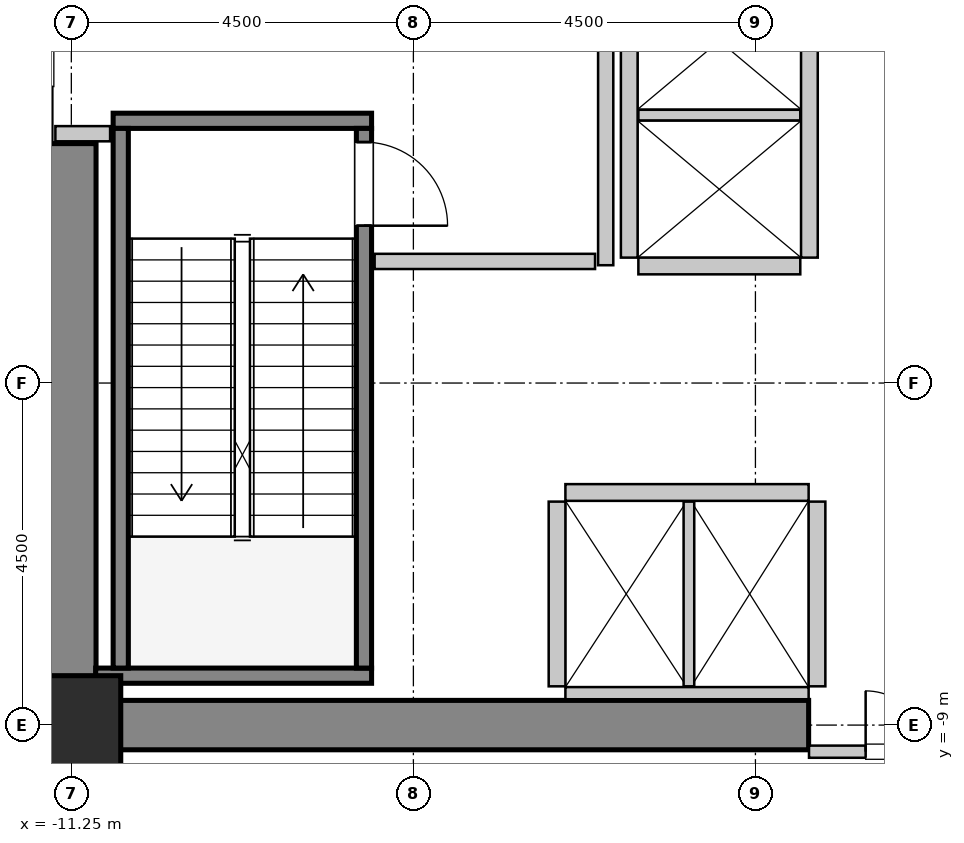
"""IFC4 building model, lengths in metres.
Left out: names, types, materials, properties, quantities, classifications, styles, units other than length and angle.
Written with IfcOpenShell. Run it as: python <this file> out.ifc"""

import sys

from ifc_helpers import new_model, si_unit, direction, frame, frame_2d, origin, origin_2d, place, context, subcontext, project, spatial, rectangle, hollow_rectangle, extrude, source, transform, mapped, element, fill, save


model = new_model("IFC4")
c1 = context("Model", 3, precision=1e-05, world=origin(), true_north=direction((0.0, 1.0)))
c2 = subcontext(c1, "Body", "Model", "MODEL_VIEW")
j1 = project(units=[si_unit("LENGTHUNIT", "METRE"), si_unit("PLANEANGLEUNIT", "RADIAN")], contexts=[c1])
p1 = place(None, origin())
s1 = spatial("IfcSite", under=j1, at=p1, CompositionType="ELEMENT")
p2 = place(p1, origin())
s2 = spatial("IfcBuilding", under=s1, at=p2, CompositionType="ELEMENT")
p3 = place(p2, frame((0.0, 0.0, 11.4)))
s3 = spatial("IfcBuildingStorey", under=s2, at=p3, CompositionType="ELEMENT", Elevation=11.4)
m1 = source(origin(), c2, "Body", "SweptSolid", [
    extrude(rectangle(XDim=10.025, YDim=0.65, at=frame_2d((5.012, 0.0))), origin(), (0.0, 0.0, 1.0), 5.4),
])
p4 = place(p3, frame((-11.575, -9.0, 0.0), z_axis=(0.0, 0.0, 1.0), x_axis=(1.0, 0.0, 0.0)))
e1 = element("IfcWall", 1, at=p4, inside=s3, PredefinedType="SHEAR", context=c2, shape_type="MappedRepresentation", body=[
    mapped(m1, transform((0.0, 0.0, 0.0), x_axis=(1.0, 0.0, 0.0), y_axis=(0.0, 1.0, 0.0), z_axis=(0.0, 0.0, 1.0), scale=1.0)),
])
m2 = source(origin(), c2, "Body", "SweptSolid", [
    extrude(rectangle(XDim=7.325, YDim=0.65, at=frame_2d((3.663, 0.0))), origin(), (0.0, 0.0, 1.0), 5.4),
])
p5 = place(p3, frame((-11.25, -8.675, 0.0), z_axis=(0.0, 0.0, 1.0), x_axis=(0.0, 1.0, 0.0)))
e2 = element("IfcWall", 2, at=p5, inside=s3, PredefinedType="SHEAR", context=c2, shape_type="MappedRepresentation", body=[
    mapped(m2, transform((0.0, 0.0, 0.0), x_axis=(1.0, 0.0, 0.0), y_axis=(0.0, 1.0, 0.0), z_axis=(0.0, 0.0, 1.0), scale=1.0)),
])
m3 = source(origin(), c2, "Body", "SweptSolid", [
    extrude(hollow_rectangle(XDim=1.3, YDim=1.3, WallThickness=0.065, InnerFilletRadius=0.065, OuterFilletRadius=0.13, at=origin_2d()), origin(), (0.0, 0.0, 1.0), 5.4),
])
p6 = place(p3, frame((-11.25, -9.0, 0.0), z_axis=(0.0, 0.0, 1.0), x_axis=(1.0, 0.0, 0.0)))
e3 = element("IfcColumn", 3, at=p6, inside=s3, PredefinedType="COLUMN", context=c2, shape_type="MappedRepresentation", body=[
    mapped(m3, transform((0.0, 0.0, 0.0), x_axis=(1.0, 0.0, 0.0), y_axis=(0.0, 1.0, 0.0), z_axis=(0.0, 0.0, 1.0), scale=1.0)),
])
m4 = source(origin(), c2, "Body", "SweptSolid", [
    extrude(rectangle(XDim=3.4, YDim=0.2, at=frame_2d((1.7, 0.0))), origin(), (0.0, 0.0, 1.0), 5.4),
])
p7 = place(p3, frame((-10.7, -1.05, 0.0), z_axis=(0.0, 0.0, 1.0), x_axis=(1.0, 0.0, 0.0)))
e4 = element("IfcWall", 4, at=p7, inside=s3, PredefinedType="SOLIDWALL", context=c2, shape_type="MappedRepresentation", body=[
    mapped(m4, transform((0.0, 0.0, 0.0), x_axis=(1.0, 0.0, 0.0), y_axis=(0.0, 1.0, 0.0), z_axis=(0.0, 0.0, 1.0), scale=1.0)),
])
m5 = source(origin(), c2, "Body", "SweptSolid", [
    extrude(rectangle(XDim=3.63, YDim=0.2, at=frame_2d((1.815, 0.0))), origin(), (0.0, 0.0, 1.0), 5.4),
])
p8 = place(p3, frame((-10.93, -8.35, 0.0), z_axis=(0.0, 0.0, 1.0), x_axis=(1.0, 0.0, 0.0)))
e5 = element("IfcWall", 5, at=p8, inside=s3, PredefinedType="SOLIDWALL", context=c2, shape_type="MappedRepresentation", body=[
    mapped(m5, transform((0.0, 0.0, 0.0), x_axis=(1.0, 0.0, 0.0), y_axis=(0.0, 1.0, 0.0), z_axis=(0.0, 0.0, 1.0), scale=1.0)),
])
m6 = source(origin(), c2, "Body", "SweptSolid", [
    extrude(rectangle(XDim=7.1, YDim=0.2, at=frame_2d((3.55, 0.0))), origin(), (0.0, 0.0, 1.0), 5.4),
])
p9 = place(p3, frame((-10.6, -1.15, 0.0), z_axis=(0.0, 0.0, 1.0), x_axis=(0.0, -1.0, 0.0)))
e6 = element("IfcWall", 6, at=p9, inside=s3, PredefinedType="SOLIDWALL", context=c2, shape_type="MappedRepresentation", body=[
    mapped(m6, transform((0.0, 0.0, 0.0), x_axis=(1.0, 0.0, 0.0), y_axis=(0.0, 1.0, 0.0), z_axis=(0.0, 0.0, 1.0), scale=1.0)),
])
p10 = place(p3, frame((-7.4, -1.15, 0.0), z_axis=(0.0, 0.0, 1.0), x_axis=(0.0, -1.0, 0.0)))
e7 = element("IfcWall", 7, at=p10, inside=s3, PredefinedType="SOLIDWALL", context=c2, shape_type="MappedRepresentation", body=[
    mapped(m6, transform((0.0, 0.0, 0.0), x_axis=(1.0, 0.0, 0.0), y_axis=(0.0, 1.0, 0.0), z_axis=(0.0, 0.0, 1.0), scale=1.0)),
])
p11 = place(p10, frame((0.18, 0.0, 0.0)))
e8 = element("IfcOpeningElement", 8, at=p11, cuts=e7, PredefinedType="OPENING", context=c2, shape_type="SweptSolid", body=[
    extrude(rectangle(XDim=1.1, YDim=2.15, at=frame_2d((0.55, 1.075))), frame((0.0, 0.11, 0.0), z_axis=(0.0, -1.0, 0.0), x_axis=(1.0, 0.0, 0.0)), (0.0, 0.0, 1.0), 0.22),
])
m7 = source(origin(), c2, "Body", "SweptSolid", [
    extrude(rectangle(XDim=3.2, YDim=0.22, at=frame_2d((1.6, 0.0))), origin(), (0.0, 0.0, 1.0), 5.085),
])
p12 = place(p3, frame((-1.55, -5.94, 0.0), z_axis=(0.0, 0.0, 1.0), x_axis=(-1.0, 0.0, 0.0)))
e9 = element("IfcWall", 9, at=p12, inside=s3, PredefinedType="SOLIDWALL", context=c2, shape_type="MappedRepresentation", body=[
    mapped(m7, transform((0.0, 0.0, 0.0), x_axis=(1.0, 0.0, 0.0), y_axis=(0.0, 1.0, 0.0), z_axis=(0.0, 0.0, 1.0), scale=1.0)),
])
m8 = source(origin(), c2, "Body", "SweptSolid", [
    extrude(rectangle(XDim=3.2, YDim=0.16, at=frame_2d((1.6, 0.0))), origin(), (0.0, 0.0, 1.0), 3.975),
])
p13 = place(p3, frame((-4.75, -8.58, 0.0), z_axis=(0.0, 0.0, 1.0), x_axis=(1.0, 0.0, 0.0)))
e10 = element("IfcWall", 10, at=p13, inside=s3, PredefinedType="PARTITIONING", context=c2, shape_type="MappedRepresentation", body=[
    mapped(m8, transform((0.0, 0.0, 0.0), x_axis=(1.0, 0.0, 0.0), y_axis=(0.0, 1.0, 0.0), z_axis=(0.0, 0.0, 1.0), scale=1.0)),
])
m9 = source(origin(), c2, "Body", "SweptSolid", [
    extrude(rectangle(XDim=2.43, YDim=0.22, at=frame_2d((1.215, 0.0))), origin(), (0.0, 0.0, 1.0), 5.085),
])
p14 = place(p3, frame((-4.86, -6.06, 0.0), z_axis=(0.0, 0.0, 1.0), x_axis=(0.0, -1.0, 0.0)))
e11 = element("IfcWall", 11, at=p14, inside=s3, PredefinedType="SOLIDWALL", context=c2, shape_type="MappedRepresentation", body=[
    mapped(m9, transform((0.0, 0.0, 0.0), x_axis=(1.0, 0.0, 0.0), y_axis=(0.0, 1.0, 0.0), z_axis=(0.0, 0.0, 1.0), scale=1.0)),
])
m10 = source(origin(), c2, "Body", "SweptSolid", [
    extrude(rectangle(XDim=2.43, YDim=0.14, at=frame_2d((1.215, 0.0))), origin(), (0.0, 0.0, 1.0), 5.085),
])
p15 = place(p3, frame((-3.125, -8.49, 0.0), z_axis=(0.0, 0.0, 1.0), x_axis=(0.0, 1.0, 0.0)))
e12 = element("IfcWall", 12, at=p15, inside=s3, PredefinedType="PARTITIONING", context=c2, shape_type="MappedRepresentation", body=[
    mapped(m10, transform((0.0, 0.0, 0.0), x_axis=(1.0, 0.0, 0.0), y_axis=(0.0, 1.0, 0.0), z_axis=(0.0, 0.0, 1.0), scale=1.0)),
])
p16 = place(p3, frame((-1.44, -8.49, 0.0), z_axis=(0.0, 0.0, 1.0), x_axis=(0.0, 1.0, 0.0)))
e13 = element("IfcWall", 13, at=p16, inside=s3, PredefinedType="SOLIDWALL", context=c2, shape_type="MappedRepresentation", body=[
    mapped(m9, transform((0.0, 0.0, 0.0), x_axis=(1.0, 0.0, 0.0), y_axis=(0.0, 1.0, 0.0), z_axis=(0.0, 0.0, 1.0), scale=1.0)),
])
m11 = source(origin(), c2, "Body", "SweptSolid", [
    extrude(rectangle(XDim=5.7, YDim=0.22, at=frame_2d((2.85, 0.0))), origin(), (0.0, 0.0, 1.0), 5.085),
])
for number, where, z_axis, x_axis in (
    (14, (-1.54, -2.85, 0.0), (0.0, 0.0, 1.0), (0.0, 1.0, 0.0)),
    (15, (-3.91, 2.85, 0.0), (0.0, 0.0, 1.0), (0.0, -1.0, 0.0)),
):
    element("IfcWall", number, at=place(p3, frame(where, z_axis=z_axis, x_axis=x_axis)), inside=s3, PredefinedType="SOLIDWALL", context=c2, shape_type="MappedRepresentation", body=[
        mapped(m11, transform((0.0, 0.0, 0.0), x_axis=(1.0, 0.0, 0.0), y_axis=(0.0, 1.0, 0.0), z_axis=(0.0, 0.0, 1.0), scale=1.0)),
    ])
m12 = source(origin(), c2, "Body", "SweptSolid", [
    extrude(rectangle(XDim=2.13, YDim=0.22, at=frame_2d((1.065, 0.0))), origin(), (0.0, 0.0, 1.0), 5.085),
])
p17 = place(p3, frame((-3.79, -2.96, 0.0), z_axis=(0.0, 0.0, 1.0), x_axis=(1.0, 0.0, 0.0)))
e16 = element("IfcWall", 16, at=p17, inside=s3, PredefinedType="SOLIDWALL", context=c2, shape_type="MappedRepresentation", body=[
    mapped(m12, transform((0.0, 0.0, 0.0), x_axis=(1.0, 0.0, 0.0), y_axis=(0.0, 1.0, 0.0), z_axis=(0.0, 0.0, 1.0), scale=1.0)),
])
m13 = source(origin(), c2, "Body", "SweptSolid", [
    extrude(rectangle(XDim=2.13, YDim=0.14, at=frame_2d((1.065, 0.0))), origin(), (0.0, 0.0, 1.0), 5.085),
])
p18 = place(p3, frame((-3.79, -0.975, 0.0), z_axis=(0.0, 0.0, 1.0), x_axis=(1.0, 0.0, 0.0)))
e17 = element("IfcWall", 17, at=p18, inside=s3, PredefinedType="PARTITIONING", context=c2, shape_type="MappedRepresentation", body=[
    mapped(m13, transform((0.0, 0.0, 0.0), x_axis=(1.0, 0.0, 0.0), y_axis=(0.0, 1.0, 0.0), z_axis=(0.0, 0.0, 1.0), scale=1.0)),
])
m14 = source(origin(), c2, "Body", "SweptSolid", [
    extrude(rectangle(XDim=5.9, YDim=0.2, at=frame_2d((2.95, 0.0))), origin(), (0.0, 0.0, 1.0), 5.085),
])
p19 = place(p3, frame((-4.22, -2.95, 0.0), z_axis=(0.0, 0.0, 1.0), x_axis=(0.0, 1.0, 0.0)))
e18 = element("IfcWall", 18, at=p19, inside=s3, PredefinedType="PARTITIONING", context=c2, shape_type="MappedRepresentation", body=[
    mapped(m14, transform((0.0, 0.0, 0.0), x_axis=(1.0, 0.0, 0.0), y_axis=(0.0, 1.0, 0.0), z_axis=(0.0, 0.0, 1.0), scale=1.0)),
])
m15 = source(origin(), c2, "Body", "SweptSolid", [
    extrude(rectangle(XDim=2.9, YDim=0.2, at=frame_2d((1.45, 0.0))), origin(), (0.0, 0.0, 1.0), 5.085),
])
p20 = place(p3, frame((-7.26, -2.9, 0.0), z_axis=(0.0, 0.0, 1.0), x_axis=(1.0, 0.0, 0.0)))
e19 = element("IfcWall", 19, at=p20, inside=s3, PredefinedType="PARTITIONING", context=c2, shape_type="MappedRepresentation", body=[
    mapped(m15, transform((0.0, 0.0, 0.0), x_axis=(1.0, 0.0, 0.0), y_axis=(0.0, 1.0, 0.0), z_axis=(0.0, 0.0, 1.0), scale=1.0)),
])
m16 = source(origin(), c2, "Body", "SweptSolid", [
    extrude(rectangle(XDim=0.72, YDim=0.2, at=frame_2d((0.36, 0.0))), origin(), (0.0, 0.0, 1.0), 5.085),
])
p21 = place(p3, frame((-11.46, -1.22, 0.0), z_axis=(0.0, 0.0, 1.0), x_axis=(1.0, 0.0, 0.0)))
e20 = element("IfcWall", 20, at=p21, inside=s3, PredefinedType="PARTITIONING", context=c2, shape_type="MappedRepresentation", body=[
    mapped(m16, transform((0.0, 0.0, 0.0), x_axis=(1.0, 0.0, 0.0), y_axis=(0.0, 1.0, 0.0), z_axis=(0.0, 0.0, 1.0), scale=1.0)),
])
m17 = source(origin(), c2, "Body", "SweptSolid", [
    extrude(rectangle(XDim=3.09, YDim=0.16, at=frame_2d((1.545, 0.0))), origin(), (0.0, 0.0, 1.0), 3.975),
])
p22 = place(p3, frame((-1.545, -9.35, 0.0), z_axis=(0.0, 0.0, 1.0), x_axis=(1.0, 0.0, 0.0)))
e21 = element("IfcWall", 21, at=p22, inside=s3, PredefinedType="PARTITIONING", context=c2, shape_type="MappedRepresentation", body=[
    mapped(m17, transform((0.0, 0.0, 0.0), x_axis=(1.0, 0.0, 0.0), y_axis=(0.0, 1.0, 0.0), z_axis=(0.0, 0.0, 1.0), scale=1.0)),
])
p23 = place(p22, frame((0.745, 0.0, 0.0)))
e22 = element("IfcOpeningElement", 22, at=p23, cuts=e21, PredefinedType="OPENING", context=c2, shape_type="SweptSolid", body=[
    extrude(rectangle(XDim=1.6, YDim=2.3, at=frame_2d((0.8, 1.15))), frame((0.0, 0.09, 0.0), z_axis=(0.0, -1.0, 0.0), x_axis=(1.0, 0.0, 0.0)), (0.0, 0.0, 1.0), 0.18),
])
m18 = source(origin(), c2, "Body", "SweptSolid", [
    extrude(rectangle(XDim=1.1, YDim=2.15, at=frame_2d((0.55, 1.075))), frame((0.0, 0.025, 0.0), z_axis=(0.0, -1.0, 0.0), x_axis=(1.0, 0.0, 0.0)), (0.0, 0.0, 1.0), 0.05),
])
p24 = place(p11, origin())
e23 = element("IfcDoor", 23, at=p24, inside=s3, OperationType="SINGLE_SWING_RIGHT", PredefinedType="DOOR", context=c2, shape_type="MappedRepresentation", body=[
    mapped(m18, transform((0.0, 0.0, 0.0), x_axis=(1.0, 0.0, 0.0), y_axis=(0.0, 1.0, 0.0), z_axis=(0.0, 0.0, 1.0), scale=1.0)),
])
fill(e8, e23)
m19 = source(origin(), c2, "Body", "SweptSolid", [
    extrude(rectangle(XDim=1.6, YDim=2.3, at=frame_2d((0.8, 1.15))), frame((0.0, 0.025, 0.0), z_axis=(0.0, -1.0, 0.0), x_axis=(1.0, 0.0, 0.0)), (0.0, 0.0, 1.0), 0.05),
])
p25 = place(p23, origin())
e24 = element("IfcDoor", 24, at=p25, inside=s3, OperationType="DOUBLE_DOOR_SINGLE_SWING", PredefinedType="DOOR", context=c2, shape_type="MappedRepresentation", body=[
    mapped(m19, transform((0.0, 0.0, 0.0), x_axis=(1.0, 0.0, 0.0), y_axis=(0.0, 1.0, 0.0), z_axis=(0.0, 0.0, 1.0), scale=1.0)),
])
fill(e22, e24)
save(model, sys.argv[1])
